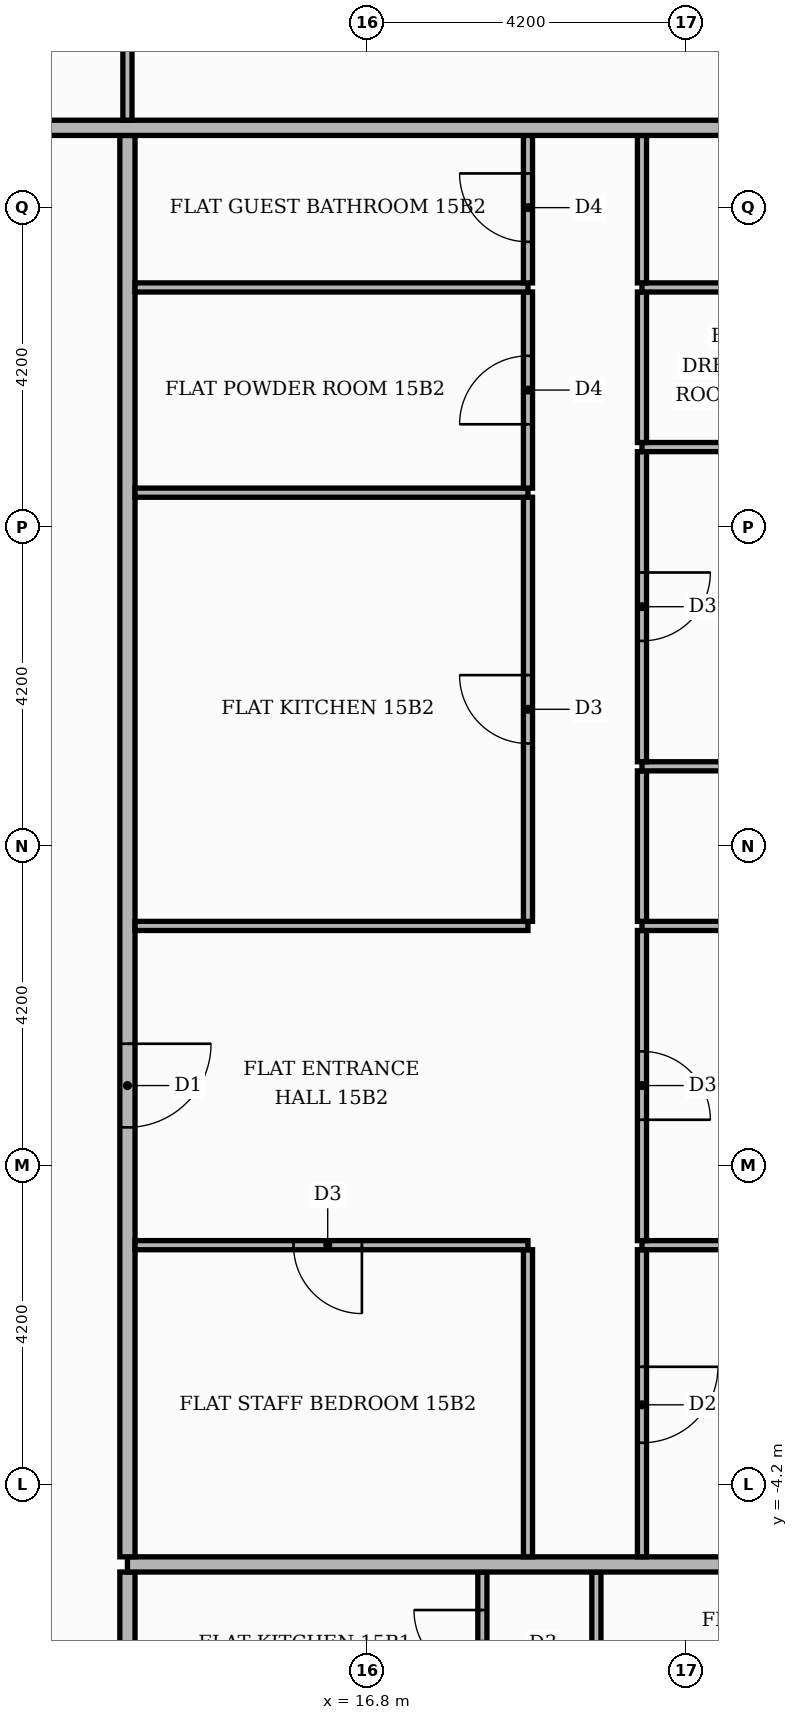
"""IFC4 building model, lengths in metres.
Left out: names, types, materials, properties, quantities, classifications, styles, units other than length and angle.
Written with IfcOpenShell. Run it as: python <this file> out.ifc"""

import sys

from ifc_helpers import new_model, si_unit, direction, frame, frame_2d, origin, place, context, subcontext, project, spatial, rectangle, extrude, element, fill, save


model = new_model("IFC4")
c1 = context("Model", 3, precision=1e-05, world=origin(), true_north=direction((0.0, 1.0)))
c2 = subcontext(c1, "Body", "Model", "MODEL_VIEW")
j1 = project(units=[si_unit("LENGTHUNIT", "METRE"), si_unit("PLANEANGLEUNIT", "RADIAN")], contexts=[c1])
p1 = place(None, origin())
s1 = spatial("IfcSite", under=j1, at=p1, CompositionType="ELEMENT")
p2 = place(p1, origin())
s2 = spatial("IfcBuilding", under=s1, at=p2, CompositionType="ELEMENT")
p3 = place(p2, frame((0.0, 0.0, 66.0)))
s3 = spatial("IfcBuildingStorey", under=s2, at=p3, CompositionType="ELEMENT", Elevation=66.0)
p4 = place(p3, frame((13.65, -13.55, 0.0), z_axis=(0.0, 0.0, 1.0), x_axis=(0.0, 1.0, 0.0)))
e1 = element("IfcWall", 1, at=p4, inside=s3, PredefinedType="PARTITIONING", context=c2, shape_type="SweptSolid", body=[
    extrude(rectangle(XDim=8.2, YDim=0.2, at=frame_2d((4.1, 0.0))), origin(), (0.0, 0.0, 1.0), 3.48),
])
p5 = place(p4, frame((1.45, 0.0, 0.0)))
e2 = element("IfcOpeningElement", 2, at=p5, cuts=e1, PredefinedType="OPENING", context=c2, shape_type="SweptSolid", body=[
    extrude(rectangle(XDim=1.1, YDim=2.4, at=frame_2d((0.55, 1.2))), frame((0.0, 0.11, 0.0), z_axis=(0.0, -1.0, 0.0), x_axis=(1.0, 0.0, 0.0)), (0.0, 0.0, 1.0), 0.22),
])
p6 = place(p3, frame((18.32, -7.29, 0.0), z_axis=(0.0, 0.0, 1.0), x_axis=(0.0, 1.0, 0.0)))
e3 = element("IfcWall", 3, at=p6, inside=s3, PredefinedType="PARTITIONING", context=c2, shape_type="SweptSolid", body=[
    extrude(rectangle(XDim=1.94, YDim=0.12, at=frame_2d((0.97, 0.0))), origin(), (0.0, 0.0, 1.0), 3.48),
])
p7 = place(p6, frame((0.54, 0.0, 0.0)))
e4 = element("IfcOpeningElement", 4, at=p7, cuts=e3, PredefinedType="OPENING", context=c2, shape_type="SweptSolid", body=[
    extrude(rectangle(XDim=0.9, YDim=2.1, at=frame_2d((0.45, 1.05))), frame((0.0, 0.07, 0.0), z_axis=(0.0, -1.0, 0.0), x_axis=(1.0, 0.0, 0.0)), (0.0, 0.0, 1.0), 0.14),
])
p8 = place(p3, frame((19.82, -7.29, 0.0), z_axis=(0.0, 0.0, 1.0), x_axis=(0.0, 1.0, 0.0)))
e5 = element("IfcWall", 5, at=p8, inside=s3, PredefinedType="PARTITIONING", context=c2, shape_type="SweptSolid", body=[
    extrude(rectangle(XDim=1.94, YDim=0.12, at=frame_2d((0.97, 0.0))), origin(), (0.0, 0.0, 1.0), 3.48),
])
p9 = place(p3, frame((13.65, -5.25, 0.0), z_axis=(0.0, 0.0, 1.0), x_axis=(1.0, 0.0, 0.0)))
e6 = element("IfcWall", 6, at=p9, inside=s3, PredefinedType="PARTITIONING", context=c2, shape_type="SweptSolid", body=[
    extrude(rectangle(XDim=11.77, YDim=0.2, at=frame_2d((5.885, 0.0))), origin(), (0.0, 0.0, 1.0), 3.48),
])
p10 = place(p3, frame((13.65, -5.15, 0.0), z_axis=(0.0, 0.0, 1.0), x_axis=(0.0, 1.0, 0.0)))
e7 = element("IfcWall", 7, at=p10, inside=s3, PredefinedType="PARTITIONING", context=c2, shape_type="SweptSolid", body=[
    extrude(rectangle(XDim=18.7, YDim=0.2, at=frame_2d((9.35, 0.0))), origin(), (0.0, 0.0, 1.0), 3.48),
])
p11 = place(p10, frame((5.65, 0.0, 0.0)))
e8 = element("IfcOpeningElement", 8, at=p11, cuts=e7, PredefinedType="OPENING", context=c2, shape_type="SweptSolid", body=[
    extrude(rectangle(XDim=1.1, YDim=2.4, at=frame_2d((0.55, 1.2))), frame((0.0, 0.11, 0.0), z_axis=(0.0, -1.0, 0.0), x_axis=(1.0, 0.0, 0.0)), (0.0, 0.0, 1.0), 0.22),
])
p12 = place(p3, frame((18.92, -5.15, 0.0), z_axis=(0.0, 0.0, 1.0), x_axis=(0.0, 1.0, 0.0)))
e9 = element("IfcWall", 9, at=p12, inside=s3, PredefinedType="PARTITIONING", context=c2, shape_type="SweptSolid", body=[
    extrude(rectangle(XDim=4.04, YDim=0.12, at=frame_2d((2.02, 0.0))), origin(), (0.0, 0.0, 1.0), 3.48),
])
p13 = place(p3, frame((20.42, -5.15, 0.0), z_axis=(0.0, 0.0, 1.0), x_axis=(0.0, 1.0, 0.0)))
e10 = element("IfcWall", 10, at=p13, inside=s3, PredefinedType="PARTITIONING", context=c2, shape_type="SweptSolid", body=[
    extrude(rectangle(XDim=4.04, YDim=0.12, at=frame_2d((2.02, 0.0))), origin(), (0.0, 0.0, 1.0), 3.48),
])
p14 = place(p13, frame((1.5, 0.0, 0.0)))
e11 = element("IfcOpeningElement", 11, at=p14, cuts=e10, PredefinedType="OPENING", context=c2, shape_type="SweptSolid", body=[
    extrude(rectangle(XDim=1.0, YDim=2.1, at=frame_2d((0.5, 1.05))), frame((0.0, 0.07, 0.0), z_axis=(0.0, -1.0, 0.0), x_axis=(1.0, 0.0, 0.0)), (0.0, 0.0, 1.0), 0.14),
])
p15 = place(p3, frame((13.75, -1.05, 0.0), z_axis=(0.0, 0.0, 1.0), x_axis=(1.0, 0.0, 0.0)))
e12 = element("IfcWall", 12, at=p15, inside=s3, PredefinedType="PARTITIONING", context=c2, shape_type="SweptSolid", body=[
    extrude(rectangle(XDim=5.17, YDim=0.12, at=frame_2d((2.585, 0.0))), origin(), (0.0, 0.0, 1.0), 3.48),
])
p16 = place(p15, frame((2.085, 0.0, 0.0)))
e13 = element("IfcOpeningElement", 13, at=p16, cuts=e12, PredefinedType="OPENING", context=c2, shape_type="SweptSolid", body=[
    extrude(rectangle(XDim=0.9, YDim=2.1, at=frame_2d((0.45, 1.05))), frame((0.0, 0.07, 0.0), z_axis=(0.0, -1.0, 0.0), x_axis=(1.0, 0.0, 0.0)), (0.0, 0.0, 1.0), 0.14),
])
p17 = place(p3, frame((20.42, -1.05, 0.0), z_axis=(0.0, 0.0, 1.0), x_axis=(1.0, 0.0, 0.0)))
e14 = element("IfcWall", 14, at=p17, inside=s3, PredefinedType="PARTITIONING", context=c2, shape_type="SweptSolid", body=[
    extrude(rectangle(XDim=5.0, YDim=0.12, at=frame_2d((2.5, 0.0))), origin(), (0.0, 0.0, 1.0), 3.48),
])
p18 = place(p3, frame((20.42, -0.99, 0.0), z_axis=(0.0, 0.0, 1.0), x_axis=(0.0, 1.0, 0.0)))
e15 = element("IfcWall", 15, at=p18, inside=s3, PredefinedType="PARTITIONING", context=c2, shape_type="SweptSolid", body=[
    extrude(rectangle(XDim=4.08, YDim=0.12, at=frame_2d((2.04, 0.0))), origin(), (0.0, 0.0, 1.0), 3.48),
])
p19 = place(p18, frame((1.59, 0.0, 0.0)))
e16 = element("IfcOpeningElement", 16, at=p19, cuts=e15, PredefinedType="OPENING", context=c2, shape_type="SweptSolid", body=[
    extrude(rectangle(XDim=0.9, YDim=2.1, at=frame_2d((0.45, 1.05))), frame((0.0, 0.07, 0.0), z_axis=(0.0, -1.0, 0.0), x_axis=(1.0, 0.0, 0.0)), (0.0, 0.0, 1.0), 0.14),
])
p20 = place(p3, frame((13.75, 3.15, 0.0), z_axis=(0.0, 0.0, 1.0), x_axis=(1.0, 0.0, 0.0)))
e17 = element("IfcWall", 17, at=p20, inside=s3, PredefinedType="PARTITIONING", context=c2, shape_type="SweptSolid", body=[
    extrude(rectangle(XDim=5.17, YDim=0.12, at=frame_2d((2.585, 0.0))), origin(), (0.0, 0.0, 1.0), 3.48),
])
p21 = place(p3, frame((20.42, 3.15, 0.0), z_axis=(0.0, 0.0, 1.0), x_axis=(1.0, 0.0, 0.0)))
e18 = element("IfcWall", 18, at=p21, inside=s3, PredefinedType="PARTITIONING", context=c2, shape_type="SweptSolid", body=[
    extrude(rectangle(XDim=5.0, YDim=0.12, at=frame_2d((2.5, 0.0))), origin(), (0.0, 0.0, 1.0), 3.48),
])
p22 = place(p21, frame((2.2, 0.0, 0.0)))
e19 = element("IfcOpeningElement", 19, at=p22, cuts=e18, PredefinedType="OPENING", context=c2, shape_type="SweptSolid", body=[
    extrude(rectangle(XDim=0.9, YDim=2.1, at=frame_2d((0.45, 1.05))), frame((0.0, 0.07, 0.0), z_axis=(0.0, -1.0, 0.0), x_axis=(1.0, 0.0, 0.0)), (0.0, 0.0, 1.0), 0.14),
])
p23 = place(p3, frame((18.92, 3.21, 0.0), z_axis=(0.0, 0.0, 1.0), x_axis=(0.0, 1.0, 0.0)))
e20 = element("IfcWall", 20, at=p23, inside=s3, PredefinedType="PARTITIONING", context=c2, shape_type="SweptSolid", body=[
    extrude(rectangle(XDim=5.58, YDim=0.12, at=frame_2d((2.79, 0.0))), origin(), (0.0, 0.0, 1.0), 3.48),
])
p24 = place(p23, frame((2.34, 0.0, 0.0)))
e21 = element("IfcOpeningElement", 21, at=p24, cuts=e20, PredefinedType="OPENING", context=c2, shape_type="SweptSolid", body=[
    extrude(rectangle(XDim=0.9, YDim=2.1, at=frame_2d((0.45, 1.05))), frame((0.0, 0.07, 0.0), z_axis=(0.0, -1.0, 0.0), x_axis=(1.0, 0.0, 0.0)), (0.0, 0.0, 1.0), 0.14),
])
p25 = place(p3, frame((20.42, 3.21, 0.0), z_axis=(0.0, 0.0, 1.0), x_axis=(0.0, 1.0, 0.0)))
e22 = element("IfcWall", 22, at=p25, inside=s3, PredefinedType="PARTITIONING", context=c2, shape_type="SweptSolid", body=[
    extrude(rectangle(XDim=1.98, YDim=0.12, at=frame_2d((0.99, 0.0))), origin(), (0.0, 0.0, 1.0), 3.48),
])
p26 = place(p3, frame((20.42, 5.25, 0.0), z_axis=(0.0, 0.0, 1.0), x_axis=(1.0, 0.0, 0.0)))
e23 = element("IfcWall", 23, at=p26, inside=s3, PredefinedType="PARTITIONING", context=c2, shape_type="SweptSolid", body=[
    extrude(rectangle(XDim=5.0, YDim=0.12, at=frame_2d((2.5, 0.0))), origin(), (0.0, 0.0, 1.0), 3.48),
])
p27 = place(p3, frame((20.42, 5.31, 0.0), z_axis=(0.0, 0.0, 1.0), x_axis=(0.0, 1.0, 0.0)))
e24 = element("IfcWall", 24, at=p27, inside=s3, PredefinedType="PARTITIONING", context=c2, shape_type="SweptSolid", body=[
    extrude(rectangle(XDim=4.08, YDim=0.12, at=frame_2d((2.04, 0.0))), origin(), (0.0, 0.0, 1.0), 3.48),
])
p28 = place(p27, frame((1.59, 0.0, 0.0)))
e25 = element("IfcOpeningElement", 25, at=p28, cuts=e24, PredefinedType="OPENING", context=c2, shape_type="SweptSolid", body=[
    extrude(rectangle(XDim=0.9, YDim=2.1, at=frame_2d((0.45, 1.05))), frame((0.0, 0.07, 0.0), z_axis=(0.0, -1.0, 0.0), x_axis=(1.0, 0.0, 0.0)), (0.0, 0.0, 1.0), 0.14),
])
p29 = place(p3, frame((13.75, 8.85, 0.0), z_axis=(0.0, 0.0, 1.0), x_axis=(1.0, 0.0, 0.0)))
e26 = element("IfcWall", 26, at=p29, inside=s3, PredefinedType="PARTITIONING", context=c2, shape_type="SweptSolid", body=[
    extrude(rectangle(XDim=5.17, YDim=0.12, at=frame_2d((2.585, 0.0))), origin(), (0.0, 0.0, 1.0), 3.48),
])
p30 = place(p3, frame((18.92, 8.91, 0.0), z_axis=(0.0, 0.0, 1.0), x_axis=(0.0, 1.0, 0.0)))
e27 = element("IfcWall", 27, at=p30, inside=s3, PredefinedType="PARTITIONING", context=c2, shape_type="SweptSolid", body=[
    extrude(rectangle(XDim=2.58, YDim=0.12, at=frame_2d((1.29, 0.0))), origin(), (0.0, 0.0, 1.0), 3.48),
])
p31 = place(p30, frame((0.84, 0.0, 0.0)))
e28 = element("IfcOpeningElement", 28, at=p31, cuts=e27, PredefinedType="OPENING", context=c2, shape_type="SweptSolid", body=[
    extrude(rectangle(XDim=0.9, YDim=2.1, at=frame_2d((0.45, 1.05))), frame((0.0, 0.07, 0.0), z_axis=(0.0, -1.0, 0.0), x_axis=(1.0, 0.0, 0.0)), (0.0, 0.0, 1.0), 0.14),
])
p32 = place(p3, frame((20.42, 9.45, 0.0), z_axis=(0.0, 0.0, 1.0), x_axis=(1.0, 0.0, 0.0)))
e29 = element("IfcWall", 29, at=p32, inside=s3, PredefinedType="PARTITIONING", context=c2, shape_type="SweptSolid", body=[
    extrude(rectangle(XDim=5.0, YDim=0.12, at=frame_2d((2.5, 0.0))), origin(), (0.0, 0.0, 1.0), 3.48),
])
p33 = place(p32, frame((2.2, 0.0, 0.0)))
e30 = element("IfcOpeningElement", 30, at=p33, cuts=e29, PredefinedType="OPENING", context=c2, shape_type="SweptSolid", body=[
    extrude(rectangle(XDim=0.9, YDim=2.1, at=frame_2d((0.45, 1.05))), frame((0.0, 0.07, 0.0), z_axis=(0.0, -1.0, 0.0), x_axis=(1.0, 0.0, 0.0)), (0.0, 0.0, 1.0), 0.14),
])
p34 = place(p3, frame((20.42, 9.51, 0.0), z_axis=(0.0, 0.0, 1.0), x_axis=(0.0, 1.0, 0.0)))
e31 = element("IfcWall", 31, at=p34, inside=s3, PredefinedType="PARTITIONING", context=c2, shape_type="SweptSolid", body=[
    extrude(rectangle(XDim=1.98, YDim=0.12, at=frame_2d((0.99, 0.0))), origin(), (0.0, 0.0, 1.0), 3.48),
])
p35 = place(p3, frame((13.75, 11.55, 0.0), z_axis=(0.0, 0.0, 1.0), x_axis=(1.0, 0.0, 0.0)))
e32 = element("IfcWall", 32, at=p35, inside=s3, PredefinedType="PARTITIONING", context=c2, shape_type="SweptSolid", body=[
    extrude(rectangle(XDim=5.17, YDim=0.12, at=frame_2d((2.585, 0.0))), origin(), (0.0, 0.0, 1.0), 3.48),
])
p36 = place(p3, frame((20.42, 11.55, 0.0), z_axis=(0.0, 0.0, 1.0), x_axis=(1.0, 0.0, 0.0)))
e33 = element("IfcWall", 33, at=p36, inside=s3, PredefinedType="PARTITIONING", context=c2, shape_type="SweptSolid", body=[
    extrude(rectangle(XDim=5.0, YDim=0.12, at=frame_2d((2.5, 0.0))), origin(), (0.0, 0.0, 1.0), 3.48),
])
p37 = place(p36, frame((2.2, 0.0, 0.0)))
e34 = element("IfcOpeningElement", 34, at=p37, cuts=e33, PredefinedType="OPENING", context=c2, shape_type="SweptSolid", body=[
    extrude(rectangle(XDim=0.9, YDim=2.1, at=frame_2d((0.45, 1.05))), frame((0.0, 0.07, 0.0), z_axis=(0.0, -1.0, 0.0), x_axis=(1.0, 0.0, 0.0)), (0.0, 0.0, 1.0), 0.14),
])
p38 = place(p3, frame((18.92, 11.61, 0.0), z_axis=(0.0, 0.0, 1.0), x_axis=(0.0, 1.0, 0.0)))
e35 = element("IfcWall", 35, at=p38, inside=s3, PredefinedType="PARTITIONING", context=c2, shape_type="SweptSolid", body=[
    extrude(rectangle(XDim=1.94, YDim=0.12, at=frame_2d((0.97, 0.0))), origin(), (0.0, 0.0, 1.0), 3.48),
])
p39 = place(p38, frame((0.54, 0.0, 0.0)))
e36 = element("IfcOpeningElement", 36, at=p39, cuts=e35, PredefinedType="OPENING", context=c2, shape_type="SweptSolid", body=[
    extrude(rectangle(XDim=0.9, YDim=2.1, at=frame_2d((0.45, 1.05))), frame((0.0, 0.07, 0.0), z_axis=(0.0, -1.0, 0.0), x_axis=(1.0, 0.0, 0.0)), (0.0, 0.0, 1.0), 0.14),
])
p40 = place(p3, frame((20.42, 11.61, 0.0), z_axis=(0.0, 0.0, 1.0), x_axis=(0.0, 1.0, 0.0)))
e37 = element("IfcWall", 37, at=p40, inside=s3, PredefinedType="PARTITIONING", context=c2, shape_type="SweptSolid", body=[
    extrude(rectangle(XDim=1.94, YDim=0.12, at=frame_2d((0.97, 0.0))), origin(), (0.0, 0.0, 1.0), 3.48),
])
p41 = place(p3, frame((-13.65, 13.65, 0.0), z_axis=(0.0, 0.0, 1.0), x_axis=(1.0, 0.0, 0.0)))
e38 = element("IfcWall", 38, at=p41, inside=s3, PredefinedType="PARTITIONING", context=c2, shape_type="SweptSolid", body=[
    extrude(rectangle(XDim=39.07, YDim=0.2, at=frame_2d((19.535, 0.0))), origin(), (0.0, 0.0, 1.0), 3.48),
])
p42 = place(p41, frame((23.6, 0.0, 0.0)))
e39 = element("IfcOpeningElement", 39, at=p42, cuts=e38, PredefinedType="OPENING", context=c2, shape_type="SweptSolid", body=[
    extrude(rectangle(XDim=1.1, YDim=2.4, at=frame_2d((0.55, 1.2))), frame((0.0, 0.11, 0.0), z_axis=(0.0, -1.0, 0.0), x_axis=(1.0, 0.0, 0.0)), (0.0, 0.0, 1.0), 0.22),
])
p43 = place(p3, frame((13.65, 13.75, 0.0), z_axis=(0.0, 0.0, 1.0), x_axis=(0.0, 1.0, 0.0)))
e40 = element("IfcWall", 40, at=p43, inside=s3, PredefinedType="PARTITIONING", context=c2, shape_type="SweptSolid", body=[
    extrude(rectangle(XDim=6.91, YDim=0.12, at=frame_2d((3.455, 0.0))), origin(), (0.0, 0.0, 1.0), 3.48),
])
p44 = place(p43, frame((2.935, 0.0, 0.0)))
e41 = element("IfcOpeningElement", 41, at=p44, cuts=e40, PredefinedType="OPENING", context=c2, shape_type="SweptSolid", body=[
    extrude(rectangle(XDim=1.0, YDim=2.1, at=frame_2d((0.5, 1.05))), frame((0.0, 0.07, 0.0), z_axis=(0.0, -1.0, 0.0), x_axis=(1.0, 0.0, 0.0)), (0.0, 0.0, 1.0), 0.14),
])
p45 = place(p7, origin())
e42 = element("IfcDoor", 42, at=p45, inside=s3, OperationType="SINGLE_SWING_RIGHT", PredefinedType="DOOR", context=c2, shape_type="SweptSolid", body=[
    extrude(rectangle(XDim=0.9, YDim=2.1, at=frame_2d((0.45, 1.05))), frame((0.0, 0.025, 0.0), z_axis=(0.0, -1.0, 0.0), x_axis=(1.0, 0.0, 0.0)), (0.0, 0.0, 1.0), 0.05),
])
fill(e4, e42)
p46 = place(p11, frame((1.1, 0.0, 0.0), z_axis=(0.0, 0.0, 1.0), x_axis=(-1.0, 0.0, 0.0)))
e43 = element("IfcDoor", 43, at=p46, inside=s3, OperationType="SINGLE_SWING_RIGHT", PredefinedType="DOOR", context=c2, shape_type="SweptSolid", body=[
    extrude(rectangle(XDim=1.1, YDim=2.4, at=frame_2d((0.55, 1.2))), frame((0.0, 0.025, 0.0), z_axis=(0.0, -1.0, 0.0), x_axis=(1.0, 0.0, 0.0)), (0.0, 0.0, 1.0), 0.05),
])
fill(e8, e43)
p47 = place(p16, frame((0.9, 0.0, 0.0), z_axis=(0.0, 0.0, 1.0), x_axis=(-1.0, 0.0, 0.0)))
e44 = element("IfcDoor", 44, at=p47, inside=s3, OperationType="SINGLE_SWING_RIGHT", PredefinedType="DOOR", context=c2, shape_type="SweptSolid", body=[
    extrude(rectangle(XDim=0.9, YDim=2.1, at=frame_2d((0.45, 1.05))), frame((0.0, 0.025, 0.0), z_axis=(0.0, -1.0, 0.0), x_axis=(1.0, 0.0, 0.0)), (0.0, 0.0, 1.0), 0.05),
])
fill(e13, e44)
p48 = place(p24, origin())
e45 = element("IfcDoor", 45, at=p48, inside=s3, OperationType="SINGLE_SWING_RIGHT", PredefinedType="DOOR", context=c2, shape_type="SweptSolid", body=[
    extrude(rectangle(XDim=0.9, YDim=2.1, at=frame_2d((0.45, 1.05))), frame((0.0, 0.025, 0.0), z_axis=(0.0, -1.0, 0.0), x_axis=(1.0, 0.0, 0.0)), (0.0, 0.0, 1.0), 0.05),
])
fill(e21, e45)
p49 = place(p31, origin())
e46 = element("IfcDoor", 46, at=p49, inside=s3, OperationType="SINGLE_SWING_LEFT", PredefinedType="DOOR", context=c2, shape_type="SweptSolid", body=[
    extrude(rectangle(XDim=0.9, YDim=2.1, at=frame_2d((0.45, 1.05))), frame((0.0, 0.025, 0.0), z_axis=(0.0, -1.0, 0.0), x_axis=(1.0, 0.0, 0.0)), (0.0, 0.0, 1.0), 0.05),
])
fill(e28, e46)
p50 = place(p39, origin())
e47 = element("IfcDoor", 47, at=p50, inside=s3, OperationType="SINGLE_SWING_RIGHT", PredefinedType="DOOR", context=c2, shape_type="SweptSolid", body=[
    extrude(rectangle(XDim=0.9, YDim=2.1, at=frame_2d((0.45, 1.05))), frame((0.0, 0.025, 0.0), z_axis=(0.0, -1.0, 0.0), x_axis=(1.0, 0.0, 0.0)), (0.0, 0.0, 1.0), 0.05),
])
fill(e36, e47)
p51 = place(p14, frame((1.0, 0.0, 0.0), z_axis=(0.0, 0.0, 1.0), x_axis=(-1.0, 0.0, 0.0)))
e48 = element("IfcDoor", 48, at=p51, inside=s3, OperationType="SINGLE_SWING_RIGHT", PredefinedType="DOOR", context=c2, shape_type="SweptSolid", body=[
    extrude(rectangle(XDim=1.0, YDim=2.1, at=frame_2d((0.5, 1.05))), frame((0.0, 0.025, 0.0), z_axis=(0.0, -1.0, 0.0), x_axis=(1.0, 0.0, 0.0)), (0.0, 0.0, 1.0), 0.05),
])
fill(e11, e48)
p52 = place(p19, frame((0.9, 0.0, 0.0), z_axis=(0.0, 0.0, 1.0), x_axis=(-1.0, 0.0, 0.0)))
e49 = element("IfcDoor", 49, at=p52, inside=s3, OperationType="SINGLE_SWING_LEFT", PredefinedType="DOOR", context=c2, shape_type="SweptSolid", body=[
    extrude(rectangle(XDim=0.9, YDim=2.1, at=frame_2d((0.45, 1.05))), frame((0.0, 0.025, 0.0), z_axis=(0.0, -1.0, 0.0), x_axis=(1.0, 0.0, 0.0)), (0.0, 0.0, 1.0), 0.05),
])
fill(e16, e49)
p53 = place(p28, frame((0.9, 0.0, 0.0), z_axis=(0.0, 0.0, 1.0), x_axis=(-1.0, 0.0, 0.0)))
e50 = element("IfcDoor", 50, at=p53, inside=s3, OperationType="SINGLE_SWING_RIGHT", PredefinedType="DOOR", context=c2, shape_type="SweptSolid", body=[
    extrude(rectangle(XDim=0.9, YDim=2.1, at=frame_2d((0.45, 1.05))), frame((0.0, 0.025, 0.0), z_axis=(0.0, -1.0, 0.0), x_axis=(1.0, 0.0, 0.0)), (0.0, 0.0, 1.0), 0.05),
])
fill(e25, e50)
save(model, sys.argv[1])
